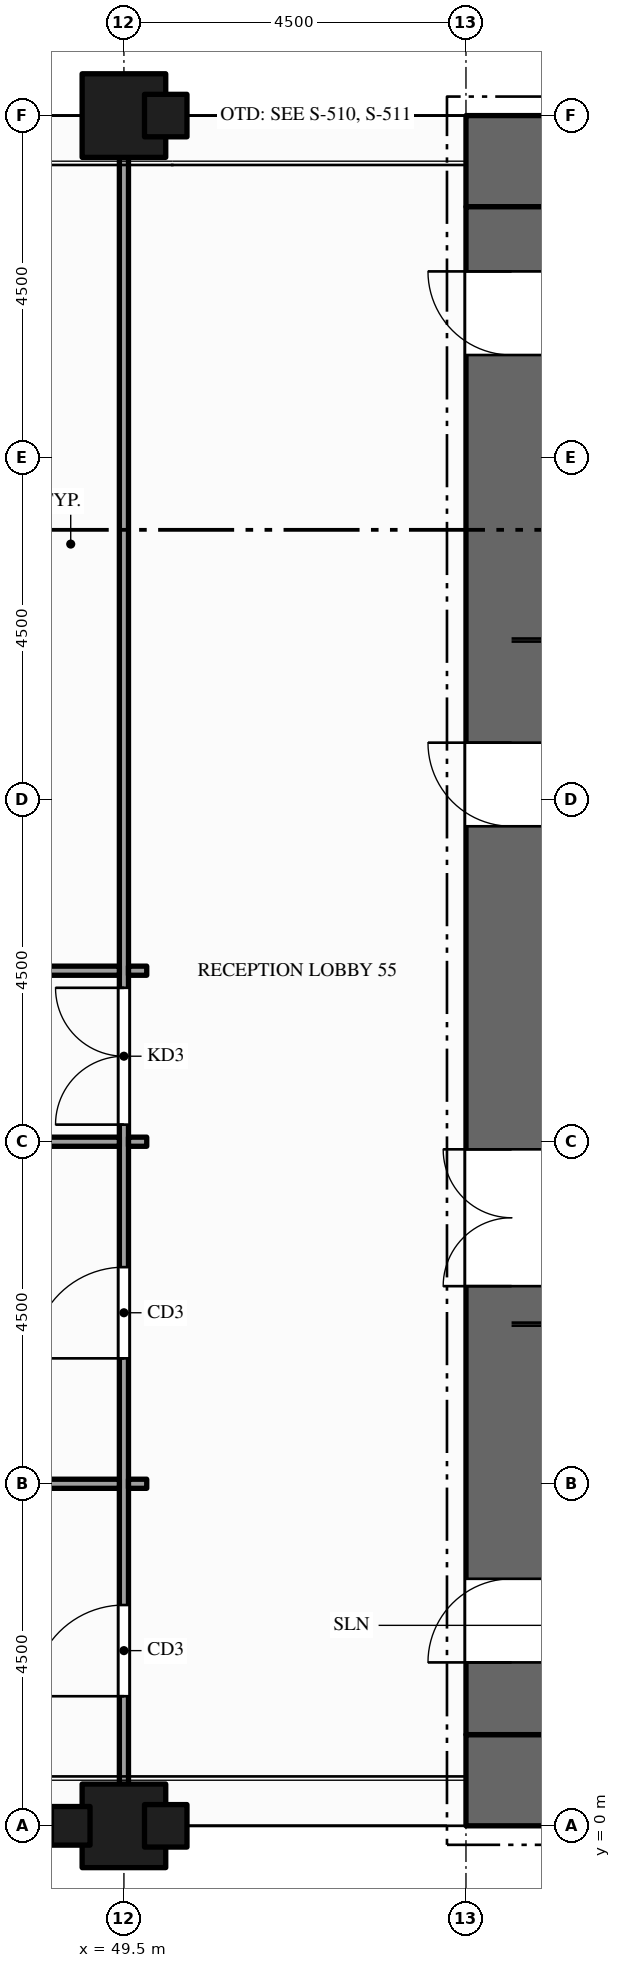
"""IFC4 building model, lengths in metres.
Left out: names, types, materials, properties, quantities, classifications, styles, units other than length and angle.
Written with IfcOpenShell. Run it as: python <this file> out.ifc"""

import sys

from ifc_helpers import new_model, si_unit, direction, frame, frame_2d, origin, origin_2d, place, context, subcontext, project, spatial, rectangle, hollow_rectangle, extrude, element, fill, save


model = new_model("IFC4")
c1 = context("Model", 3, precision=1e-05, world=origin(), true_north=direction((0.0, 1.0)))
c2 = subcontext(c1, "Body", "Model", "MODEL_VIEW")
j1 = project(units=[si_unit("LENGTHUNIT", "METRE"), si_unit("PLANEANGLEUNIT", "RADIAN")], contexts=[c1])
p1 = place(None, origin())
s1 = spatial("IfcSite", under=j1, at=p1, CompositionType="ELEMENT")
p2 = place(p1, origin())
s2 = spatial("IfcBuilding", under=s1, at=p2, CompositionType="ELEMENT")
p3 = place(p2, frame((0.0, 0.0, 77.0)))
s3 = spatial("IfcBuildingStorey", under=s2, at=p3, CompositionType="ELEMENT", Elevation=77.0)
for number, where, z_axis, x_axis in (
    (1, (67.5, 0.6, -0.15), (0.0, 0.0, 1.0), (-1.0, 0.0, 0.0)),
    (2, (54.0, 21.9, -0.15), (0.0, 0.0, 1.0), (1.0, 0.0, 0.0)),
):
    element("IfcWall", number, at=place(p3, frame(where, z_axis=z_axis, x_axis=x_axis)), inside=s3, PredefinedType="SHEAR", context=c2, shape_type="SweptSolid", body=[
        extrude(rectangle(XDim=13.5, YDim=1.2, at=frame_2d((6.75, 0.0))), origin(), (0.0, 0.0, 1.0), 6.0),
    ])
p4 = place(p3, frame((54.6, 1.2, -0.15), z_axis=(0.0, 0.0, 1.0), x_axis=(0.0, 1.0, 0.0)))
e3 = element("IfcWall", 3, at=p4, inside=s3, PredefinedType="SHEAR", context=c2, shape_type="SweptSolid", body=[
    extrude(rectangle(XDim=20.1, YDim=1.2, at=frame_2d((10.05, 0.0))), origin(), (0.0, 0.0, 1.0), 6.0),
])
p5 = place(p4, frame((5.9, 0.0, 0.15)))
e4 = element("IfcOpeningElement", 4, at=p5, cuts=e3, PredefinedType="OPENING", context=c2, shape_type="SweptSolid", body=[
    extrude(rectangle(XDim=1.8, YDim=2.1, at=frame_2d((0.9, 1.05))), frame((0.0, 0.61, 0.0), z_axis=(0.0, -1.0, 0.0), x_axis=(1.0, 0.0, 0.0)), (0.0, 0.0, 1.0), 1.22),
])
p6 = place(p4, frame((11.95, 0.0, 0.15)))
e5 = element("IfcOpeningElement", 5, at=p6, cuts=e3, PredefinedType="OPENING", context=c2, shape_type="SweptSolid", body=[
    extrude(rectangle(XDim=1.1, YDim=2.1, at=frame_2d((0.55, 1.05))), frame((0.0, 0.61, 0.0), z_axis=(0.0, -1.0, 0.0), x_axis=(1.0, 0.0, 0.0)), (0.0, 0.0, 1.0), 1.22),
])
p7 = place(p4, frame((0.95, 0.0, 0.15)))
e6 = element("IfcOpeningElement", 6, at=p7, cuts=e3, PredefinedType="OPENING", context=c2, shape_type="SweptSolid", body=[
    extrude(rectangle(XDim=1.1, YDim=2.1, at=frame_2d((0.55, 1.05))), frame((0.0, 0.61, 0.0), z_axis=(0.0, -1.0, 0.0), x_axis=(1.0, 0.0, 0.0)), (0.0, 0.0, 1.0), 1.22),
])
p8 = place(p4, frame((18.15, 0.0, 0.15)))
e7 = element("IfcOpeningElement", 7, at=p8, cuts=e3, PredefinedType="OPENING", context=c2, shape_type="SweptSolid", body=[
    extrude(rectangle(XDim=1.1, YDim=2.1, at=frame_2d((0.55, 1.05))), frame((0.0, 0.61, 0.0), z_axis=(0.0, -1.0, 0.0), x_axis=(1.0, 0.0, 0.0)), (0.0, 0.0, 1.0), 1.22),
])
for number, where, z_axis, x_axis in (
    (8, (49.5, 0.0, -0.25), (0.0, 0.0, 1.0), (1.0, 0.0, 0.0)),
    (9, (49.5, 22.5, -0.25), (0.0, 0.0, 1.0), (1.0, 0.0, 0.0)),
):
    element("IfcColumn", number, at=place(p3, frame(where, z_axis=z_axis, x_axis=x_axis)), inside=s3, PredefinedType="COLUMN", context=c2, shape_type="SweptSolid", body=[
        extrude(hollow_rectangle(XDim=1.1, YDim=1.1, WallThickness=0.06, at=origin_2d()), origin(), (0.0, 0.0, 1.0), 6.1),
    ])
p9 = place(p3, frame((49.5, 0.15, 0.0), z_axis=(0.0, 0.0, 1.0), x_axis=(0.0, 1.0, 0.0)))
e10 = element("IfcWall", 10, at=p9, inside=s3, PredefinedType="PARTITIONING", context=c2, shape_type="SweptSolid", body=[
    extrude(rectangle(XDim=22.2, YDim=0.12, at=frame_2d((11.1, 0.0))), origin(), (0.0, 0.0, 1.0), 4.45),
])
p10 = place(p9, frame((9.075, 0.0, 0.0)))
e11 = element("IfcOpeningElement", 11, at=p10, cuts=e10, PredefinedType="OPENING", context=c2, shape_type="SweptSolid", body=[
    extrude(rectangle(XDim=1.8, YDim=2.1, at=frame_2d((0.9, 1.05))), frame((0.0, 0.07, 0.0), z_axis=(0.0, -1.0, 0.0), x_axis=(1.0, 0.0, 0.0)), (0.0, 0.0, 1.0), 0.14),
])
p11 = place(p9, frame((1.555, 0.0, 0.0)))
e12 = element("IfcOpeningElement", 12, at=p11, cuts=e10, PredefinedType="OPENING", context=c2, shape_type="SweptSolid", body=[
    extrude(rectangle(XDim=1.2, YDim=2.1, at=frame_2d((0.6, 1.05))), frame((0.0, 0.07, 0.0), z_axis=(0.0, -1.0, 0.0), x_axis=(1.0, 0.0, 0.0)), (0.0, 0.0, 1.0), 0.14),
])
p12 = place(p9, frame((6.0, 0.0, 0.0)))
e13 = element("IfcOpeningElement", 13, at=p12, cuts=e10, PredefinedType="OPENING", context=c2, shape_type="SweptSolid", body=[
    extrude(rectangle(XDim=1.2, YDim=2.1, at=frame_2d((0.6, 1.05))), frame((0.0, 0.07, 0.0), z_axis=(0.0, -1.0, 0.0), x_axis=(1.0, 0.0, 0.0)), (0.0, 0.0, 1.0), 0.14),
])
p13 = place(p3, frame((45.06, 4.5, 0.0), z_axis=(0.0, 0.0, 1.0), x_axis=(1.0, 0.0, 0.0)))
e14 = element("IfcWall", 14, at=p13, inside=s3, PredefinedType="PARTITIONING", context=c2, shape_type="SweptSolid", body=[
    extrude(rectangle(XDim=4.38, YDim=0.12, at=frame_2d((2.19, 0.0))), origin(), (0.0, 0.0, 1.0), 4.938),
])
p14 = place(p3, frame((49.56, 4.5, 0.0), z_axis=(0.0, 0.0, 1.0), x_axis=(1.0, 0.0, 0.0)))
e15 = element("IfcWall", 15, at=p14, inside=s3, PredefinedType="PARTITIONING", context=c2, shape_type="SweptSolid", body=[
    extrude(rectangle(XDim=0.24, YDim=0.12, at=frame_2d((0.12, 0.0))), origin(), (0.0, 0.0, 1.0), 4.938),
])
p15 = place(p3, frame((45.06, 9.0, 0.0), z_axis=(0.0, 0.0, 1.0), x_axis=(1.0, 0.0, 0.0)))
e16 = element("IfcWall", 16, at=p15, inside=s3, PredefinedType="PARTITIONING", context=c2, shape_type="SweptSolid", body=[
    extrude(rectangle(XDim=4.38, YDim=0.12, at=frame_2d((2.19, 0.0))), origin(), (0.0, 0.0, 1.0), 4.938),
])
p16 = place(p3, frame((49.56, 9.0, 0.0), z_axis=(0.0, 0.0, 1.0), x_axis=(1.0, 0.0, 0.0)))
e17 = element("IfcWall", 17, at=p16, inside=s3, PredefinedType="PARTITIONING", context=c2, shape_type="SweptSolid", body=[
    extrude(rectangle(XDim=0.24, YDim=0.12, at=frame_2d((0.12, 0.0))), origin(), (0.0, 0.0, 1.0), 4.938),
])
p17 = place(p3, frame((42.81, 11.25, 0.0), z_axis=(0.0, 0.0, 1.0), x_axis=(1.0, 0.0, 0.0)))
e18 = element("IfcWall", 18, at=p17, inside=s3, PredefinedType="PARTITIONING", context=c2, shape_type="SweptSolid", body=[
    extrude(rectangle(XDim=6.63, YDim=0.12, at=frame_2d((3.315, 0.0))), origin(), (0.0, 0.0, 1.0), 4.938),
])
p18 = place(p17, frame((2.815, 0.0, 0.0)))
e19 = element("IfcOpeningElement", 19, at=p18, cuts=e18, PredefinedType="OPENING", context=c2, shape_type="SweptSolid", body=[
    extrude(rectangle(XDim=1.0, YDim=2.1, at=frame_2d((0.5, 1.05))), frame((0.0, 0.07, 0.0), z_axis=(0.0, -1.0, 0.0), x_axis=(1.0, 0.0, 0.0)), (0.0, 0.0, 1.0), 0.14),
])
p19 = place(p3, frame((49.56, 11.25, 0.0), z_axis=(0.0, 0.0, 1.0), x_axis=(1.0, 0.0, 0.0)))
e20 = element("IfcWall", 20, at=p19, inside=s3, PredefinedType="PARTITIONING", context=c2, shape_type="SweptSolid", body=[
    extrude(rectangle(XDim=0.24, YDim=0.12, at=frame_2d((0.12, 0.0))), origin(), (0.0, 0.0, 1.0), 4.938),
])
p20 = place(p5, origin())
e21 = element("IfcDoor", 21, at=p20, inside=s3, OperationType="DOUBLE_DOOR_SINGLE_SWING", PredefinedType="DOOR", context=c2, shape_type="SweptSolid", body=[
    extrude(rectangle(XDim=1.8, YDim=2.1, at=frame_2d((0.9, 1.05))), frame((0.0, 0.025, 0.0), z_axis=(0.0, -1.0, 0.0), x_axis=(1.0, 0.0, 0.0)), (0.0, 0.0, 1.0), 0.05),
])
fill(e4, e21)
p21 = place(p6, origin())
e22 = element("IfcDoor", 22, at=p21, inside=s3, OperationType="SINGLE_SWING_RIGHT", PredefinedType="DOOR", context=c2, shape_type="SweptSolid", body=[
    extrude(rectangle(XDim=1.1, YDim=2.1, at=frame_2d((0.55, 1.05))), frame((0.0, 0.025, 0.0), z_axis=(0.0, -1.0, 0.0), x_axis=(1.0, 0.0, 0.0)), (0.0, 0.0, 1.0), 0.05),
])
fill(e5, e22)
p22 = place(p7, origin())
e23 = element("IfcDoor", 23, at=p22, inside=s3, OperationType="SINGLE_SWING_LEFT", PredefinedType="DOOR", context=c2, shape_type="SweptSolid", body=[
    extrude(rectangle(XDim=1.1, YDim=2.1, at=frame_2d((0.55, 1.05))), frame((0.0, 0.025, 0.0), z_axis=(0.0, -1.0, 0.0), x_axis=(1.0, 0.0, 0.0)), (0.0, 0.0, 1.0), 0.05),
])
fill(e6, e23)
p23 = place(p8, origin())
e24 = element("IfcDoor", 24, at=p23, inside=s3, OperationType="SINGLE_SWING_RIGHT", PredefinedType="DOOR", context=c2, shape_type="SweptSolid", body=[
    extrude(rectangle(XDim=1.1, YDim=2.1, at=frame_2d((0.55, 1.05))), frame((0.0, 0.025, 0.0), z_axis=(0.0, -1.0, 0.0), x_axis=(1.0, 0.0, 0.0)), (0.0, 0.0, 1.0), 0.05),
])
fill(e7, e24)
p24 = place(p10, origin())
e25 = element("IfcDoor", 25, at=p24, inside=s3, OperationType="DOUBLE_DOOR_SINGLE_SWING", PredefinedType="DOOR", context=c2, shape_type="SweptSolid", body=[
    extrude(rectangle(XDim=1.8, YDim=2.1, at=frame_2d((0.9, 1.05))), frame((0.0, 0.025, 0.0), z_axis=(0.0, -1.0, 0.0), x_axis=(1.0, 0.0, 0.0)), (0.0, 0.0, 1.0), 0.05),
])
fill(e11, e25)
p25 = place(p11, origin())
e26 = element("IfcDoor", 26, at=p25, inside=s3, OperationType="SINGLE_SWING_LEFT", PredefinedType="DOOR", context=c2, shape_type="SweptSolid", body=[
    extrude(rectangle(XDim=1.2, YDim=2.1, at=frame_2d((0.6, 1.05))), frame((0.0, 0.025, 0.0), z_axis=(0.0, -1.0, 0.0), x_axis=(1.0, 0.0, 0.0)), (0.0, 0.0, 1.0), 0.05),
])
fill(e12, e26)
p26 = place(p12, origin())
e27 = element("IfcDoor", 27, at=p26, inside=s3, OperationType="SINGLE_SWING_LEFT", PredefinedType="DOOR", context=c2, shape_type="SweptSolid", body=[
    extrude(rectangle(XDim=1.2, YDim=2.1, at=frame_2d((0.6, 1.05))), frame((0.0, 0.025, 0.0), z_axis=(0.0, -1.0, 0.0), x_axis=(1.0, 0.0, 0.0)), (0.0, 0.0, 1.0), 0.05),
])
fill(e13, e27)
save(model, sys.argv[1])
